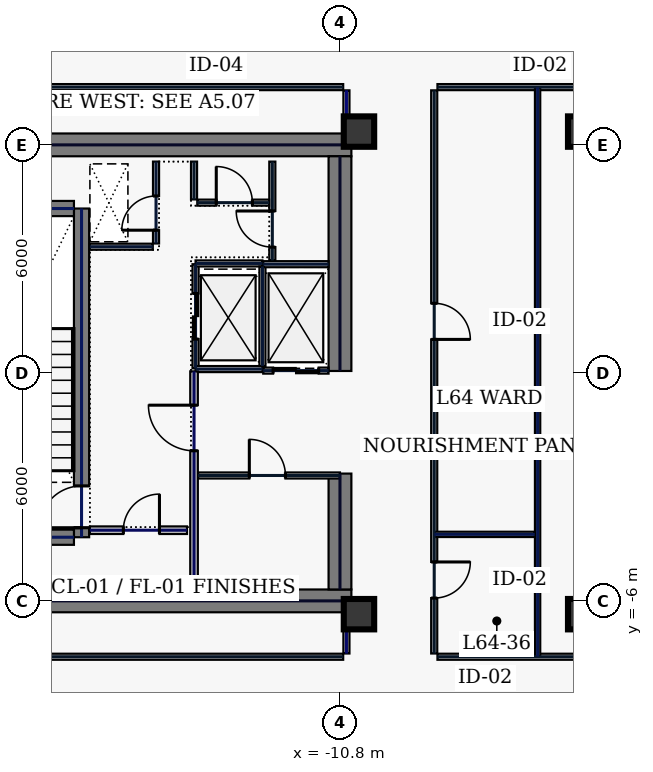
"""IFC4 building model, lengths in metres.
Left out: names, types, materials, properties, quantities, classifications, styles, units other than length and angle.
Written with IfcOpenShell. Run it as: python <this file> out.ifc"""

import sys

from ifc_helpers import new_model, si_unit, direction, frame, frame_2d, origin, origin_2d, place, context, subcontext, project, spatial, rectangle, hollow_rectangle, extrude, element, fill, save


model = new_model("IFC4")
c1 = context("Model", 3, precision=1e-05, world=origin(), true_north=direction((0.0, 1.0)))
c2 = subcontext(c1, "Body", "Model", "MODEL_VIEW")
j1 = project(units=[si_unit("LENGTHUNIT", "METRE"), si_unit("PLANEANGLEUNIT", "RADIAN")], contexts=[c1])
p1 = place(None, origin())
s1 = spatial("IfcSite", under=j1, at=p1, CompositionType="ELEMENT")
p2 = place(p1, origin())
s2 = spatial("IfcBuilding", under=s1, at=p2, CompositionType="ELEMENT")
p3 = place(p2, frame((0.0, 0.0, 277.0)))
s3 = spatial("IfcBuildingStorey", under=s2, at=p3, CompositionType="ELEMENT", Elevation=277.0)
for number, where, z_axis, x_axis in (
    (1, (-22.0, 6.0, 0.0), (0.0, 0.0, 1.0), (1.0, 0.0, 0.0)),
    (2, (-22.0, -6.0, 0.0), (0.0, 0.0, 1.0), (1.0, 0.0, 0.0)),
):
    element("IfcWall", number, at=place(p3, frame(where, z_axis=z_axis, x_axis=x_axis)), inside=s3, PredefinedType="SHEAR", context=c2, shape_type="SweptSolid", body=[
        extrude(rectangle(XDim=11.5, YDim=0.6, at=frame_2d((5.75, 0.0))), origin(), (0.0, 0.0, 1.0), 3.74),
    ])
p4 = place(p3, frame((-10.8, -5.7, 0.0), z_axis=(0.0, 0.0, 1.0), x_axis=(0.0, 1.0, 0.0)))
e3 = element("IfcWall", 3, at=p4, inside=s3, PredefinedType="SHEAR", context=c2, shape_type="SweptSolid", body=[
    extrude(rectangle(XDim=3.05, YDim=0.6, at=frame_2d((1.525, 0.0))), origin(), (0.0, 0.0, 1.0), 3.74),
])
p5 = place(p3, frame((-10.8, 0.05, 0.0), z_axis=(0.0, 0.0, 1.0), x_axis=(0.0, 1.0, 0.0)))
e4 = element("IfcWall", 4, at=p5, inside=s3, PredefinedType="SHEAR", context=c2, shape_type="SweptSolid", body=[
    extrude(rectangle(XDim=5.65, YDim=0.6, at=frame_2d((2.825, 0.0))), origin(), (0.0, 0.0, 1.0), 3.74),
])
p6 = place(p3, frame((-17.6, -4.325, 0.0), z_axis=(0.0, 0.0, 1.0), x_axis=(0.0, 1.0, 0.0)))
e5 = element("IfcWall", 5, at=p6, inside=s3, PredefinedType="SHEAR", context=c2, shape_type="SweptSolid", body=[
    extrude(rectangle(XDim=8.65, YDim=0.4, at=frame_2d((4.325, 0.0))), origin(), (0.0, 0.0, 1.0), 3.74),
])
p7 = place(p6, frame((0.25, 0.0, 0.0)))
e6 = element("IfcOpeningElement", 6, at=p7, cuts=e5, PredefinedType="OPENING", context=c2, shape_type="SweptSolid", body=[
    extrude(rectangle(XDim=1.1, YDim=2.2, at=frame_2d((0.55, 1.1))), frame((0.0, 0.21, 0.0), z_axis=(0.0, -1.0, 0.0), x_axis=(1.0, 0.0, 0.0)), (0.0, 0.0, 1.0), 0.42),
])
for number, where, z_axis, x_axis in (
    (7, (-21.2, -4.325, 0.0), (0.0, 0.0, 1.0), (1.0, 0.0, 0.0)),
    (8, (-21.2, 4.325, 0.0), (0.0, 0.0, 1.0), (1.0, 0.0, 0.0)),
):
    element("IfcWall", number, at=place(p3, frame(where, z_axis=z_axis, x_axis=x_axis)), inside=s3, PredefinedType="SHEAR", context=c2, shape_type="SweptSolid", body=[
        extrude(rectangle(XDim=3.4, YDim=0.4, at=frame_2d((1.7, 0.0))), origin(), (0.0, 0.0, 1.0), 3.74),
    ])
for number, where, z_axis, x_axis in (
    (9, (-10.3, -6.35, 0.0), (0.0, 0.0, 1.0), (1.0, 0.0, 0.0)),
    (10, (-10.3, 6.35, 0.0), (0.0, 0.0, 1.0), (1.0, 0.0, 0.0)),
    (11, (-4.4, -6.35, 0.0), (0.0, 0.0, 1.0), (1.0, 0.0, 0.0)),
    (12, (-4.4, 6.35, 0.0), (0.0, 0.0, 1.0), (1.0, 0.0, 0.0)),
):
    element("IfcColumn", number, at=place(p3, frame(where, z_axis=z_axis, x_axis=x_axis)), inside=s3, PredefinedType="COLUMN", context=c2, shape_type="SweptSolid", body=[
        extrude(hollow_rectangle(XDim=0.8, YDim=0.8, WallThickness=0.036, at=origin_2d()), origin(), (0.0, 0.0, 1.0), 3.74),
    ])
p8 = place(p3, frame((-14.6, 0.12, 0.0), z_axis=(0.0, 0.0, 1.0), x_axis=(0.0, 1.0, 0.0)))
e13 = element("IfcWall", 13, at=p8, inside=s3, PredefinedType="PARTITIONING", context=c2, shape_type="SweptSolid", body=[
    extrude(rectangle(XDim=2.74, YDim=0.16, at=frame_2d((1.37, 0.0))), origin(), (0.0, 0.0, 1.0), 3.74),
])
p9 = place(p8, frame((0.77, 0.0, 0.0)))
e14 = element("IfcOpeningElement", 14, at=p9, cuts=e13, PredefinedType="OPENING", context=c2, shape_type="SweptSolid", body=[
    extrude(rectangle(XDim=1.2, YDim=2.2, at=frame_2d((0.6, 1.1))), frame((0.0, 0.09, 0.0), z_axis=(0.0, -1.0, 0.0), x_axis=(1.0, 0.0, 0.0)), (0.0, 0.0, 1.0), 0.18),
])
for number, where, z_axis, x_axis in (
    (15, (-14.6, 0.1, 0.0), (0.0, 0.0, 1.0), (1.0, 0.0, 0.0)),
    (16, (-14.6, 2.88, 0.0), (0.0, 0.0, 1.0), (1.0, 0.0, 0.0)),
):
    element("IfcWall", number, at=place(p3, frame(where, z_axis=z_axis, x_axis=x_axis)), inside=s3, PredefinedType="PARTITIONING", context=c2, shape_type="SweptSolid", body=[
        extrude(rectangle(XDim=1.76, YDim=0.16, at=frame_2d((0.88, 0.0))), origin(), (0.0, 0.0, 1.0), 3.74),
    ])
p10 = place(p3, frame((-12.84, 0.18, 0.0), z_axis=(0.0, 0.0, 1.0), x_axis=(0.0, 1.0, 0.0)))
e17 = element("IfcWall", 17, at=p10, inside=s3, PredefinedType="PARTITIONING", context=c2, shape_type="SweptSolid", body=[
    extrude(rectangle(XDim=2.62, YDim=0.16, at=frame_2d((1.31, 0.0))), origin(), (0.0, 0.0, 1.0), 3.74),
])
p11 = place(p3, frame((-12.82, 0.06, 0.0), z_axis=(0.0, 0.0, 1.0), x_axis=(1.0, 0.0, 0.0)))
e18 = element("IfcWall", 18, at=p11, inside=s3, PredefinedType="PARTITIONING", context=c2, shape_type="SweptSolid", body=[
    extrude(rectangle(XDim=1.72, YDim=0.16, at=frame_2d((0.86, 0.0))), origin(), (0.0, 0.0, 1.0), 3.74),
])
p12 = place(p11, frame((0.26, 0.0, 0.0)))
e19 = element("IfcOpeningElement", 19, at=p12, cuts=e18, PredefinedType="OPENING", context=c2, shape_type="SweptSolid", body=[
    extrude(rectangle(XDim=1.2, YDim=2.2, at=frame_2d((0.6, 1.1))), frame((0.0, 0.09, 0.0), z_axis=(0.0, -1.0, 0.0), x_axis=(1.0, 0.0, 0.0)), (0.0, 0.0, 1.0), 0.18),
])
p13 = place(p3, frame((-12.82, 2.86, 0.0), z_axis=(0.0, 0.0, 1.0), x_axis=(1.0, 0.0, 0.0)))
e20 = element("IfcWall", 20, at=p13, inside=s3, PredefinedType="PARTITIONING", context=c2, shape_type="SweptSolid", body=[
    extrude(rectangle(XDim=1.72, YDim=0.16, at=frame_2d((0.86, 0.0))), origin(), (0.0, 0.0, 1.0), 3.74),
])
p14 = place(p3, frame((-15.64, 3.405, 0.0), z_axis=(0.0, 0.0, 1.0), x_axis=(0.0, 1.0, 0.0)))
e21 = element("IfcWall", 21, at=p14, inside=s3, PredefinedType="PARTITIONING", context=c2, shape_type="SweptSolid", body=[
    extrude(rectangle(XDim=2.155, YDim=0.16, at=frame_2d((1.078, 0.0))), origin(), (0.0, 0.0, 1.0), 3.74),
])
p15 = place(p14, frame((0.35, 0.0, 0.0)))
e22 = element("IfcOpeningElement", 22, at=p15, cuts=e21, PredefinedType="OPENING", context=c2, shape_type="SweptSolid", body=[
    extrude(rectangle(XDim=0.9, YDim=2.2, at=frame_2d((0.45, 1.1))), frame((0.0, 0.09, 0.0), z_axis=(0.0, -1.0, 0.0), x_axis=(1.0, 0.0, 0.0)), (0.0, 0.0, 1.0), 0.18),
])
p16 = place(p3, frame((-17.38, 3.32, 0.0), z_axis=(0.0, 0.0, 1.0), x_axis=(1.0, 0.0, 0.0)))
e23 = element("IfcWall", 23, at=p16, inside=s3, PredefinedType="PARTITIONING", context=c2, shape_type="SweptSolid", body=[
    extrude(rectangle(XDim=1.655, YDim=0.16, at=frame_2d((0.827, 0.0))), origin(), (0.0, 0.0, 1.0), 3.74),
])
p17 = place(p3, frame((-17.38, -4.14, 0.0), z_axis=(0.0, 0.0, 1.0), x_axis=(1.0, 0.0, 0.0)))
e24 = element("IfcWall", 24, at=p17, inside=s3, PredefinedType="SOLIDWALL", context=c2, shape_type="SweptSolid", body=[
    extrude(rectangle(XDim=2.555, YDim=0.2, at=frame_2d((1.277, 0.0))), origin(), (0.0, 0.0, 1.0), 3.74),
])
p18 = place(p17, frame((0.88, 0.0, 0.0)))
e25 = element("IfcOpeningElement", 25, at=p18, cuts=e24, PredefinedType="OPENING", context=c2, shape_type="SweptSolid", body=[
    extrude(rectangle(XDim=0.95, YDim=2.2, at=frame_2d((0.475, 1.1))), frame((0.0, 0.11, 0.0), z_axis=(0.0, -1.0, 0.0), x_axis=(1.0, 0.0, 0.0)), (0.0, 0.0, 1.0), 0.22),
])
p19 = place(p3, frame((-14.535, -2.7, 0.0), z_axis=(0.0, 0.0, 1.0), x_axis=(1.0, 0.0, 0.0)))
e26 = element("IfcWall", 26, at=p19, inside=s3, PredefinedType="PARTITIONING", context=c2, shape_type="SweptSolid", body=[
    extrude(rectangle(XDim=3.735, YDim=0.16, at=frame_2d((1.867, 0.0))), origin(), (0.0, 0.0, 1.0), 3.74),
])
p20 = place(p19, frame((1.35, 0.0, 0.0)))
e27 = element("IfcOpeningElement", 27, at=p20, cuts=e26, PredefinedType="OPENING", context=c2, shape_type="SweptSolid", body=[
    extrude(rectangle(XDim=0.95, YDim=2.2, at=frame_2d((0.475, 1.1))), frame((0.0, 0.09, 0.0), z_axis=(0.0, -1.0, 0.0), x_axis=(1.0, 0.0, 0.0)), (0.0, 0.0, 1.0), 0.18),
])
p21 = place(p3, frame((-12.58, 2.96, 0.0), z_axis=(0.0, 0.0, 1.0), x_axis=(0.0, 1.0, 0.0)))
e28 = element("IfcWall", 28, at=p21, inside=s3, PredefinedType="PARTITIONING", context=c2, shape_type="SweptSolid", body=[
    extrude(rectangle(XDim=2.6, YDim=0.16, at=frame_2d((1.3, 0.0))), origin(), (0.0, 0.0, 1.0), 3.74),
])
p22 = place(p21, frame((0.35, 0.0, 0.0)))
e29 = element("IfcOpeningElement", 29, at=p22, cuts=e28, PredefinedType="OPENING", context=c2, shape_type="SweptSolid", body=[
    extrude(rectangle(XDim=0.95, YDim=2.2, at=frame_2d((0.475, 1.1))), frame((0.0, 0.09, 0.0), z_axis=(0.0, -1.0, 0.0), x_axis=(1.0, 0.0, 0.0)), (0.0, 0.0, 1.0), 0.18),
])
p23 = place(p3, frame((-14.555, 4.48, 0.0), z_axis=(0.0, 0.0, 1.0), x_axis=(1.0, 0.0, 0.0)))
e30 = element("IfcWall", 30, at=p23, inside=s3, PredefinedType="PARTITIONING", context=c2, shape_type="SweptSolid", body=[
    extrude(rectangle(XDim=1.89, YDim=0.16, at=frame_2d((0.945, 0.0))), origin(), (0.0, 0.0, 1.0), 3.74),
])
p24 = place(p23, frame((0.5, 0.0, 0.0)))
e31 = element("IfcOpeningElement", 31, at=p24, cuts=e30, PredefinedType="OPENING", context=c2, shape_type="SweptSolid", body=[
    extrude(rectangle(XDim=0.95, YDim=2.2, at=frame_2d((0.475, 1.1))), frame((0.0, 0.09, 0.0), z_axis=(0.0, -1.0, 0.0), x_axis=(1.0, 0.0, 0.0)), (0.0, 0.0, 1.0), 0.18),
])
p25 = place(p3, frame((-14.64, 4.565, 0.0), z_axis=(0.0, 0.0, 1.0), x_axis=(0.0, 1.0, 0.0)))
e32 = element("IfcWall", 32, at=p25, inside=s3, PredefinedType="PARTITIONING", context=c2, shape_type="SweptSolid", body=[
    extrude(rectangle(XDim=0.995, YDim=0.16, at=frame_2d((0.498, 0.0))), origin(), (0.0, 0.0, 1.0), 3.74),
])
p26 = place(p3, frame((-14.64, -5.56, 0.0), z_axis=(0.0, 0.0, 1.0), x_axis=(0.0, 1.0, 0.0)))
e33 = element("IfcWall", 33, at=p26, inside=s3, PredefinedType="SOLIDWALL", context=c2, shape_type="SweptSolid", body=[
    extrude(rectangle(XDim=5.6, YDim=0.2, at=frame_2d((2.8, 0.0))), origin(), (0.0, 0.0, 1.0), 3.74),
])
p27 = place(p26, frame((3.51, 0.0, 0.0)))
e34 = element("IfcOpeningElement", 34, at=p27, cuts=e33, PredefinedType="OPENING", context=c2, shape_type="SweptSolid", body=[
    extrude(rectangle(XDim=1.2, YDim=2.2, at=frame_2d((0.6, 1.1))), frame((0.0, 0.11, 0.0), z_axis=(0.0, -1.0, 0.0), x_axis=(1.0, 0.0, 0.0)), (0.0, 0.0, 1.0), 0.22),
])
p28 = place(p3, frame((-3.965, 7.52, 0.0), z_axis=(0.0, 0.0, 1.0), x_axis=(-1.0, 0.0, 0.0)))
e35 = element("IfcWall", 35, at=p28, inside=s3, PredefinedType="PARTITIONING", context=c2, shape_type="SweptSolid", body=[
    extrude(rectangle(XDim=4.27, YDim=0.16, at=frame_2d((2.135, 0.0))), origin(), (0.0, 0.0, 1.0), 3.74),
])
p29 = place(p3, frame((-8.32, 7.435, 0.0), z_axis=(0.0, 0.0, 1.0), x_axis=(0.0, -1.0, 0.0)))
e36 = element("IfcWall", 36, at=p29, inside=s3, PredefinedType="PARTITIONING", context=c2, shape_type="SweptSolid", body=[
    extrude(rectangle(XDim=14.82, YDim=0.16, at=frame_2d((7.41, 0.0))), origin(), (0.0, 0.0, 1.0), 3.74),
])
p30 = place(p29, frame((12.411, 0.0, 0.0)))
e37 = element("IfcOpeningElement", 37, at=p30, cuts=e36, PredefinedType="OPENING", context=c2, shape_type="SweptSolid", body=[
    extrude(rectangle(XDim=0.95, YDim=2.2, at=frame_2d((0.475, 1.1))), frame((0.0, 0.09, 0.0), z_axis=(0.0, -1.0, 0.0), x_axis=(1.0, 0.0, 0.0)), (0.0, 0.0, 1.0), 0.18),
])
p31 = place(p29, frame((5.604, 0.0, 0.0)))
e38 = element("IfcOpeningElement", 38, at=p31, cuts=e36, PredefinedType="OPENING", context=c2, shape_type="SweptSolid", body=[
    extrude(rectangle(XDim=0.95, YDim=2.2, at=frame_2d((0.475, 1.1))), frame((0.0, 0.09, 0.0), z_axis=(0.0, -1.0, 0.0), x_axis=(1.0, 0.0, 0.0)), (0.0, 0.0, 1.0), 0.18),
])
p32 = place(p3, frame((-8.235, -7.47, 0.0), z_axis=(0.0, 0.0, 1.0), x_axis=(1.0, 0.0, 0.0)))
e39 = element("IfcWall", 39, at=p32, inside=s3, PredefinedType="PARTITIONING", context=c2, shape_type="SweptSolid", body=[
    extrude(rectangle(XDim=4.27, YDim=0.16, at=frame_2d((2.135, 0.0))), origin(), (0.0, 0.0, 1.0), 3.74),
])
p33 = place(p3, frame((-10.63, -7.385, 0.0), z_axis=(0.0, 0.0, 1.0), x_axis=(0.0, 1.0, 0.0)))
e40 = element("IfcWall", 40, at=p33, inside=s3, PredefinedType="PARTITIONING", context=c2, shape_type="SweptSolid", body=[
    extrude(rectangle(XDim=0.965, YDim=0.16, at=frame_2d((0.482, 0.0))), origin(), (0.0, 0.0, 1.0), 1.535),
])
p34 = place(p3, frame((-10.63, 6.42, 0.0), z_axis=(0.0, 0.0, 1.0), x_axis=(0.0, 1.0, 0.0)))
e41 = element("IfcWall", 41, at=p34, inside=s3, PredefinedType="PARTITIONING", context=c2, shape_type="SweptSolid", body=[
    extrude(rectangle(XDim=1.015, YDim=0.16, at=frame_2d((0.508, 0.0))), origin(), (0.0, 0.0, 1.0), 2.135),
])
for number, where, z_axis, x_axis in (
    (42, (-10.715, 7.52, 0.0), (0.0, 0.0, 1.0), (-1.0, 0.0, 0.0)),
    (43, (-21.915, -7.47, 0.0), (0.0, 0.0, 1.0), (1.0, 0.0, 0.0)),
):
    element("IfcWall", number, at=place(p3, frame(where, z_axis=z_axis, x_axis=x_axis)), inside=s3, PredefinedType="PARTITIONING", context=c2, shape_type="SweptSolid", body=[
        extrude(rectangle(XDim=11.2, YDim=0.16, at=frame_2d((5.6, 0.0))), origin(), (0.0, 0.0, 1.0), 3.74),
    ])
p35 = place(p3, frame((-5.6, -7.465, 0.0), z_axis=(0.0, 0.0, 1.0), x_axis=(0.0, 1.0, 0.0)))
e44 = element("IfcWall", 44, at=p35, inside=s3, PredefinedType="PARTITIONING", context=c2, shape_type="SweptSolid", body=[
    extrude(rectangle(XDim=14.98, YDim=0.14, at=frame_2d((7.49, 0.0))), origin(), (0.0, 0.0, 1.0), 3.74),
])
p36 = place(p3, frame((-8.315, -4.25, 0.0), z_axis=(0.0, 0.0, 1.0), x_axis=(1.0, 0.0, 0.0)))
e45 = element("IfcWall", 45, at=p36, inside=s3, PredefinedType="PARTITIONING", context=c2, shape_type="SweptSolid", body=[
    extrude(rectangle(XDim=2.64, YDim=0.14, at=frame_2d((1.32, 0.0))), origin(), (0.0, 0.0, 1.0), 3.74),
])
p37 = place(p7, origin())
e46 = element("IfcDoor", 46, at=p37, inside=s3, OperationType="SINGLE_SWING_LEFT", PredefinedType="DOOR", context=c2, shape_type="SweptSolid", body=[
    extrude(rectangle(XDim=1.1, YDim=2.2, at=frame_2d((0.55, 1.1))), frame((0.0, 0.025, 0.0), z_axis=(0.0, -1.0, 0.0), x_axis=(1.0, 0.0, 0.0)), (0.0, 0.0, 1.0), 0.05),
])
fill(e6, e46)
p38 = place(p9, origin())
e47 = element("IfcDoor", 47, at=p38, inside=s3, OperationType="SLIDING_TO_LEFT", PredefinedType="DOOR", context=c2, shape_type="SweptSolid", body=[
    extrude(rectangle(XDim=1.2, YDim=2.2, at=frame_2d((0.6, 1.1))), frame((0.0, 0.025, 0.0), z_axis=(0.0, -1.0, 0.0), x_axis=(1.0, 0.0, 0.0)), (0.0, 0.0, 1.0), 0.05),
])
fill(e14, e47)
p39 = place(p12, origin())
e48 = element("IfcDoor", 48, at=p39, inside=s3, OperationType="SLIDING_TO_LEFT", PredefinedType="DOOR", context=c2, shape_type="SweptSolid", body=[
    extrude(rectangle(XDim=1.2, YDim=2.2, at=frame_2d((0.6, 1.1))), frame((0.0, 0.025, 0.0), z_axis=(0.0, -1.0, 0.0), x_axis=(1.0, 0.0, 0.0)), (0.0, 0.0, 1.0), 0.05),
])
fill(e19, e48)
p40 = place(p15, origin())
e49 = element("IfcDoor", 49, at=p40, inside=s3, OperationType="SINGLE_SWING_LEFT", PredefinedType="DOOR", context=c2, shape_type="SweptSolid", body=[
    extrude(rectangle(XDim=0.9, YDim=2.2, at=frame_2d((0.45, 1.1))), frame((0.0, 0.025, 0.0), z_axis=(0.0, -1.0, 0.0), x_axis=(1.0, 0.0, 0.0)), (0.0, 0.0, 1.0), 0.05),
])
fill(e22, e49)
p41 = place(p18, origin())
e50 = element("IfcDoor", 50, at=p41, inside=s3, OperationType="SINGLE_SWING_RIGHT", PredefinedType="DOOR", context=c2, shape_type="SweptSolid", body=[
    extrude(rectangle(XDim=0.95, YDim=2.2, at=frame_2d((0.475, 1.1))), frame((0.0, 0.025, 0.0), z_axis=(0.0, -1.0, 0.0), x_axis=(1.0, 0.0, 0.0)), (0.0, 0.0, 1.0), 0.05),
])
fill(e25, e50)
p42 = place(p20, origin())
e51 = element("IfcDoor", 51, at=p42, inside=s3, OperationType="SINGLE_SWING_LEFT", PredefinedType="DOOR", context=c2, shape_type="SweptSolid", body=[
    extrude(rectangle(XDim=0.95, YDim=2.2, at=frame_2d((0.475, 1.1))), frame((0.0, 0.025, 0.0), z_axis=(0.0, -1.0, 0.0), x_axis=(1.0, 0.0, 0.0)), (0.0, 0.0, 1.0), 0.05),
])
fill(e27, e51)
p43 = place(p22, origin())
e52 = element("IfcDoor", 52, at=p43, inside=s3, OperationType="SINGLE_SWING_RIGHT", PredefinedType="DOOR", context=c2, shape_type="SweptSolid", body=[
    extrude(rectangle(XDim=0.95, YDim=2.2, at=frame_2d((0.475, 1.1))), frame((0.0, 0.025, 0.0), z_axis=(0.0, -1.0, 0.0), x_axis=(1.0, 0.0, 0.0)), (0.0, 0.0, 1.0), 0.05),
])
fill(e29, e52)
p44 = place(p24, origin())
e53 = element("IfcDoor", 53, at=p44, inside=s3, OperationType="SINGLE_SWING_LEFT", PredefinedType="DOOR", context=c2, shape_type="SweptSolid", body=[
    extrude(rectangle(XDim=0.95, YDim=2.2, at=frame_2d((0.475, 1.1))), frame((0.0, 0.025, 0.0), z_axis=(0.0, -1.0, 0.0), x_axis=(1.0, 0.0, 0.0)), (0.0, 0.0, 1.0), 0.05),
])
fill(e31, e53)
p45 = place(p27, origin())
e54 = element("IfcDoor", 54, at=p45, inside=s3, OperationType="SINGLE_SWING_RIGHT", PredefinedType="DOOR", context=c2, shape_type="SweptSolid", body=[
    extrude(rectangle(XDim=1.2, YDim=2.2, at=frame_2d((0.6, 1.1))), frame((0.0, 0.025, 0.0), z_axis=(0.0, -1.0, 0.0), x_axis=(1.0, 0.0, 0.0)), (0.0, 0.0, 1.0), 0.05),
])
fill(e34, e54)
p46 = place(p30, origin())
e55 = element("IfcDoor", 55, at=p46, inside=s3, OperationType="SINGLE_SWING_LEFT", PredefinedType="DOOR", context=c2, shape_type="SweptSolid", body=[
    extrude(rectangle(XDim=0.95, YDim=2.2, at=frame_2d((0.475, 1.1))), frame((0.0, 0.025, 0.0), z_axis=(0.0, -1.0, 0.0), x_axis=(1.0, 0.0, 0.0)), (0.0, 0.0, 1.0), 0.05),
])
fill(e37, e55)
p47 = place(p31, origin())
e56 = element("IfcDoor", 56, at=p47, inside=s3, OperationType="SINGLE_SWING_RIGHT", PredefinedType="DOOR", context=c2, shape_type="SweptSolid", body=[
    extrude(rectangle(XDim=0.95, YDim=2.2, at=frame_2d((0.475, 1.1))), frame((0.0, 0.025, 0.0), z_axis=(0.0, -1.0, 0.0), x_axis=(1.0, 0.0, 0.0)), (0.0, 0.0, 1.0), 0.05),
])
fill(e38, e56)
save(model, sys.argv[1])
